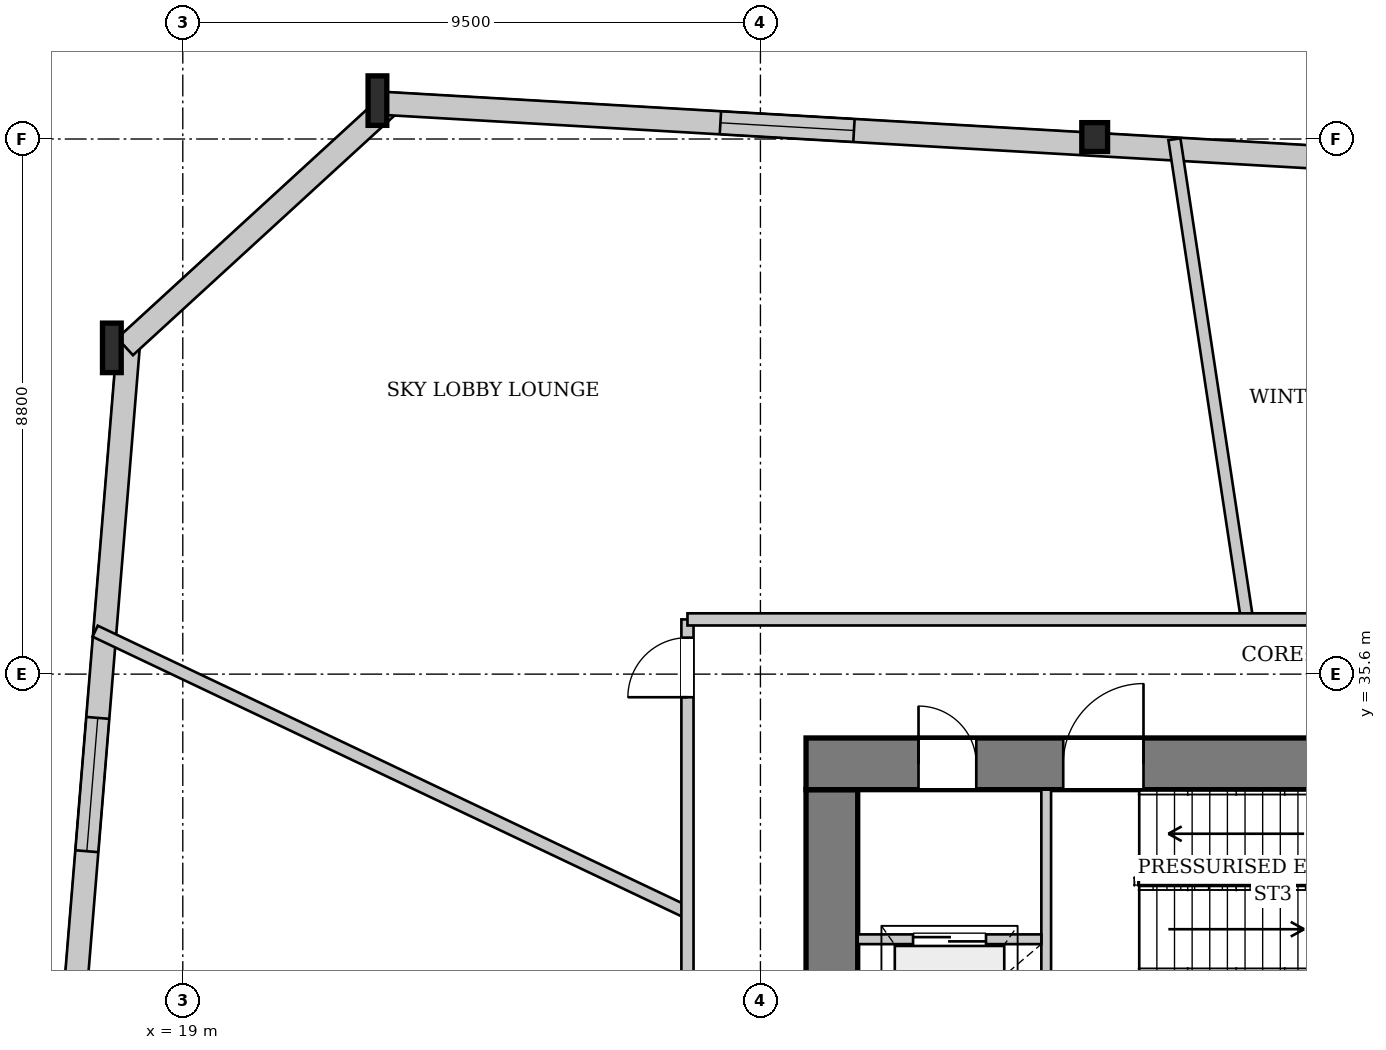
"""IFC4 building model, lengths in metres.
Left out: names, types, materials, properties, quantities, classifications, styles, units other than length and angle.
Written with IfcOpenShell. Run it as: python <this file> out.ifc"""

import sys

from ifc_helpers import new_model, si_unit, direction, frame, frame_2d, origin, origin_2d, place, context, subcontext, project, spatial, rectangle, i_section, extrude, source, transform, mapped, element, fill, save


model = new_model("IFC4")
c1 = context("Model", 3, precision=1e-05, world=origin(), true_north=direction((0.0, 1.0)))
c2 = subcontext(c1, "Body", "Model", "MODEL_VIEW")
j1 = project(units=[si_unit("LENGTHUNIT", "METRE"), si_unit("PLANEANGLEUNIT", "RADIAN")], contexts=[c1])
p1 = place(None, origin())
s1 = spatial("IfcSite", under=j1, at=p1, CompositionType="ELEMENT")
p2 = place(p1, origin())
s2 = spatial("IfcBuilding", under=s1, at=p2, CompositionType="ELEMENT")
p3 = place(p2, frame((0.0, 0.0, 75.9)))
s3 = spatial("IfcBuildingStorey", under=s2, at=p3, CompositionType="ELEMENT", Elevation=75.9)
m1 = source(origin(), c2, "Body", "SweptSolid", [
    extrude(i_section(OverallWidth=0.424, OverallDepth=0.474, WebThickness=0.043, FlangeThickness=0.068, at=origin_2d()), origin(), (0.0, 0.0, 1.0), 3.848),
])
p4 = place(p3, frame((34.143, 44.494, 0.0), z_axis=(-0.075687253982, -0.0318482829, 0.996622860696), x_axis=(0.387849749228, -0.921722611214, 0.0)))
e1 = element("IfcColumn", 1, at=p4, inside=s3, PredefinedType="COLUMN", context=c2, shape_type="MappedRepresentation", body=[
    mapped(m1, transform((0.0, 0.0, 0.0), x_axis=(1.0, 0.0, 0.0), y_axis=(0.0, 1.0, 0.0), z_axis=(0.0, 0.0, 1.0), scale=1.0)),
])
m2 = source(origin(), c2, "Body", "SweptSolid", [
    extrude(i_section(OverallWidth=0.308, OverallDepth=0.814, WebThickness=0.021, FlangeThickness=0.04, at=origin_2d()), origin(), (0.0, 0.0, 1.0), 3.856),
])
p5 = place(p3, frame((22.343, 45.175, 0.0), z_axis=(-0.073565449241, -0.074198542608, 0.994526370165), x_axis=(0.710129855377, -0.704070726918, 0.0)))
e2 = element("IfcColumn", 2, at=p5, inside=s3, PredefinedType="COLUMN", context=c2, shape_type="MappedRepresentation", body=[
    mapped(m2, transform((0.0, 0.0, 0.0), x_axis=(1.0, 0.0, 0.0), y_axis=(0.0, 1.0, 0.0), z_axis=(0.0, 0.0, 1.0), scale=1.0)),
])
m3 = source(origin(), c2, "Body", "SweptSolid", [
    extrude(i_section(OverallWidth=0.308, OverallDepth=0.814, WebThickness=0.021, FlangeThickness=0.04, at=origin_2d()), origin(), (0.0, 0.0, 1.0), 3.853),
])
p6 = place(p3, frame((17.924, 41.125, 0.0), z_axis=(-0.046893400017, -0.082697144624, 0.995470839003), x_axis=(0.869879191834, -0.493264829086, 0.0)))
e3 = element("IfcColumn", 3, at=p6, inside=s3, PredefinedType="COLUMN", context=c2, shape_type="MappedRepresentation", body=[
    mapped(m3, transform((0.0, 0.0, 0.0), x_axis=(1.0, 0.0, 0.0), y_axis=(0.0, 1.0, 0.0), z_axis=(0.0, 0.0, 1.0), scale=1.0)),
])
p7 = place(p3, frame((16.608, 22.78, 0.0), z_axis=(0.0, 0.0, 1.0), x_axis=(0.081813862086, 0.996647626782, 0.0)))
e4 = element("IfcWall", 4, at=p7, inside=s3, PredefinedType="SOLIDWALL", context=c2, shape_type="SweptSolid", body=[
    extrude(rectangle(XDim=18.391, YDim=0.38, at=frame_2d((9.196, 0.0))), origin(), (0.0, 0.0, 1.0), 2.872),
])
p8 = place(p7, frame((4.049, 0.0, 0.502)))
e5 = element("IfcOpeningElement", 5, at=p8, cuts=e4, PredefinedType="OPENING", context=c2, shape_type="SweptSolid", body=[
    extrude(rectangle(XDim=2.2, YDim=2.25, at=frame_2d((1.1, 1.125))), frame((0.0, 0.2, 0.0), z_axis=(0.0, -1.0, 0.0), x_axis=(1.0, 0.0, 0.0)), (0.0, 0.0, 1.0), 0.4),
])
p9 = place(p7, frame((9.941, 0.0, 0.502)))
e6 = element("IfcOpeningElement", 6, at=p9, cuts=e4, PredefinedType="OPENING", context=c2, shape_type="SweptSolid", body=[
    extrude(rectangle(XDim=2.2, YDim=2.25, at=frame_2d((1.1, 1.125))), frame((0.0, 0.2, 0.0), z_axis=(0.0, -1.0, 0.0), x_axis=(1.0, 0.0, 0.0)), (0.0, 0.0, 1.0), 0.4),
])
p10 = place(p3, frame((18.052, 40.985, 0.0), z_axis=(0.0, 0.0, 1.0), x_axis=(0.73726571063, 0.675602895146, 0.0)))
e7 = element("IfcWall", 7, at=p10, inside=s3, PredefinedType="SOLIDWALL", context=c2, shape_type="SweptSolid", body=[
    extrude(rectangle(XDim=5.994, YDim=0.38, at=frame_2d((2.997, 0.0))), origin(), (0.0, 0.0, 1.0), 2.872),
])
p11 = place(p3, frame((22.332, 44.985, 0.0), z_axis=(0.0, 0.0, 1.0), x_axis=(0.998339907415, -0.057597128944, 0.0)))
e8 = element("IfcWall", 8, at=p11, inside=s3, PredefinedType="SOLIDWALL", context=c2, shape_type="SweptSolid", body=[
    extrude(rectangle(XDim=23.64, YDim=0.38, at=frame_2d((11.82, 0.0))), origin(), (0.0, 0.0, 1.0), 2.872),
])
p12 = place(p11, frame((5.519, 0.0, 0.502)))
e9 = element("IfcOpeningElement", 9, at=p12, cuts=e8, PredefinedType="OPENING", context=c2, shape_type="SweptSolid", body=[
    extrude(rectangle(XDim=2.2, YDim=2.25, at=frame_2d((1.1, 1.125))), frame((0.0, 0.2, 0.0), z_axis=(0.0, -1.0, 0.0), x_axis=(1.0, 0.0, 0.0)), (0.0, 0.0, 1.0), 0.4),
])
p13 = place(p11, frame((15.92, 0.0, 0.502)))
e10 = element("IfcOpeningElement", 10, at=p13, cuts=e8, PredefinedType="OPENING", context=c2, shape_type="SweptSolid", body=[
    extrude(rectangle(XDim=2.2, YDim=2.25, at=frame_2d((1.1, 1.125))), frame((0.0, 0.2, 0.0), z_axis=(0.0, -1.0, 0.0), x_axis=(1.0, 0.0, 0.0)), (0.0, 0.0, 1.0), 0.4),
])
p14 = place(p3, frame((29.675, 19.5, 0.0), z_axis=(0.0, 0.0, 1.0), x_axis=(0.0, 1.0, 0.0)))
e11 = element("IfcWall", 11, at=p14, inside=s3, PredefinedType="SHEAR", context=c2, shape_type="SweptSolid", body=[
    extrude(rectangle(XDim=14.2, YDim=0.85, at=frame_2d((7.1, 0.0))), origin(), (0.0, 0.0, 1.0), 3.58),
])
p15 = place(p14, frame((7.42, 0.0, 0.0)))
e12 = element("IfcOpeningElement", 12, at=p15, cuts=e11, PredefinedType="OPENING", context=c2, shape_type="SweptSolid", body=[
    extrude(rectangle(XDim=1.6, YDim=2.2, at=frame_2d((0.8, 1.1))), frame((0.0, 0.435, 0.0), z_axis=(0.0, -1.0, 0.0), x_axis=(1.0, 0.0, 0.0)), (0.0, 0.0, 1.0), 0.87),
])
p16 = place(p3, frame((29.25, 34.125, 0.0), z_axis=(0.0, 0.0, 1.0), x_axis=(1.0, 0.0, 0.0)))
e13 = element("IfcWall", 13, at=p16, inside=s3, PredefinedType="SHEAR", context=c2, shape_type="SweptSolid", body=[
    extrude(rectangle(XDim=17.5, YDim=0.85, at=frame_2d((8.75, 0.0))), origin(), (0.0, 0.0, 1.0), 3.58),
])
p17 = place(p16, frame((1.85, 0.0, 0.0)))
e14 = element("IfcOpeningElement", 14, at=p17, cuts=e13, PredefinedType="OPENING", context=c2, shape_type="SweptSolid", body=[
    extrude(rectangle(XDim=0.95, YDim=2.1, at=frame_2d((0.475, 1.05))), frame((0.0, 0.435, 0.0), z_axis=(0.0, -1.0, 0.0), x_axis=(1.0, 0.0, 0.0)), (0.0, 0.0, 1.0), 0.87),
])
p18 = place(p16, frame((4.23, 0.0, 0.0)))
e15 = element("IfcOpeningElement", 15, at=p18, cuts=e13, PredefinedType="OPENING", context=c2, shape_type="SweptSolid", body=[
    extrude(rectangle(XDim=1.32, YDim=2.2, at=frame_2d((0.66, 1.1))), frame((0.0, 0.435, 0.0), z_axis=(0.0, -1.0, 0.0), x_axis=(1.0, 0.0, 0.0)), (0.0, 0.0, 1.0), 0.87),
])
p19 = place(p16, frame((15.3, 0.0, 0.0)))
e16 = element("IfcOpeningElement", 16, at=p19, cuts=e13, PredefinedType="OPENING", context=c2, shape_type="SweptSolid", body=[
    extrude(rectangle(XDim=0.95, YDim=2.1, at=frame_2d((0.475, 1.05))), frame((0.0, 0.435, 0.0), z_axis=(0.0, -1.0, 0.0), x_axis=(1.0, 0.0, 0.0)), (0.0, 0.0, 1.0), 0.87),
])
p20 = place(p3, frame((33.2, 28.44, 0.0), z_axis=(0.0, 0.0, 1.0), x_axis=(0.0, 1.0, 0.0)))
e17 = element("IfcWall", 17, at=p20, inside=s3, PredefinedType="PARTITIONING", context=c2, shape_type="SweptSolid", body=[
    extrude(rectangle(XDim=5.26, YDim=0.16, at=frame_2d((2.63, 0.0))), origin(), (0.0, 0.0, 1.0), 3.58),
])
p21 = place(p3, frame((30.1, 31.24, 0.0), z_axis=(0.0, 0.0, 1.0), x_axis=(1.0, 0.0, 0.0)))
e18 = element("IfcWall", 18, at=p21, inside=s3, PredefinedType="PARTITIONING", context=c2, shape_type="SweptSolid", body=[
    extrude(rectangle(XDim=3.02, YDim=0.16, at=frame_2d((1.51, 0.0))), origin(), (0.0, 0.0, 1.0), 3.58),
])
p22 = place(p21, frame((0.91, 0.0, 0.0)))
e19 = element("IfcOpeningElement", 19, at=p22, cuts=e18, PredefinedType="OPENING", context=c2, shape_type="SweptSolid", body=[
    extrude(rectangle(XDim=1.2, YDim=2.2, at=frame_2d((0.6, 1.1))), frame((0.0, 0.09, 0.0), z_axis=(0.0, -1.0, 0.0), x_axis=(1.0, 0.0, 0.0)), (0.0, 0.0, 1.0), 0.18),
])
p23 = place(p3, frame((36.503, 36.5, 0.0), z_axis=(0.0, 0.0, 1.0), x_axis=(-0.14951830516, 0.988758957695, 0.0)))
e20 = element("IfcWall", 20, at=p23, inside=s3, PredefinedType="PARTITIONING", context=c2, shape_type="SweptSolid", body=[
    extrude(rectangle(XDim=7.986, YDim=0.2, at=frame_2d((3.993, 0.0))), origin(), (0.0, 0.0, 1.0), 3.58),
])
p24 = place(p3, frame((27.3, 31.681, 0.0), z_axis=(0.0, 0.0, 1.0), x_axis=(-0.903334087768, 0.428937671318, 0.0)))
e21 = element("IfcWall", 21, at=p24, inside=s3, PredefinedType="PARTITIONING", context=c2, shape_type="SweptSolid", body=[
    extrude(rectangle(XDim=10.784, YDim=0.2, at=frame_2d((5.392, 0.0))), origin(), (0.0, 0.0, 1.0), 3.58),
])
p25 = place(p3, frame((27.3, 16.7, 0.0), z_axis=(0.0, 0.0, 1.0), x_axis=(0.0, 1.0, 0.0)))
e22 = element("IfcWall", 22, at=p25, inside=s3, PredefinedType="PARTITIONING", context=c2, shape_type="SweptSolid", body=[
    extrude(rectangle(XDim=19.8, YDim=0.2, at=frame_2d((9.9, 0.0))), origin(), (0.0, 0.0, 1.0), 3.58),
])
p26 = place(p25, frame((18.52, 0.0, 0.0)))
e23 = element("IfcOpeningElement", 23, at=p26, cuts=e22, PredefinedType="OPENING", context=c2, shape_type="SweptSolid", body=[
    extrude(rectangle(XDim=0.98, YDim=2.15, at=frame_2d((0.49, 1.075))), frame((0.0, 0.11, 0.0), z_axis=(0.0, -1.0, 0.0), x_axis=(1.0, 0.0, 0.0)), (0.0, 0.0, 1.0), 0.22),
])
p27 = place(p25, frame((10.098, 0.0, 0.0)))
e24 = element("IfcOpeningElement", 24, at=p27, cuts=e22, PredefinedType="OPENING", context=c2, shape_type="SweptSolid", body=[
    extrude(rectangle(XDim=0.98, YDim=2.15, at=frame_2d((0.49, 1.075))), frame((0.0, 0.11, 0.0), z_axis=(0.0, -1.0, 0.0), x_axis=(1.0, 0.0, 0.0)), (0.0, 0.0, 1.0), 0.22),
])
p28 = place(p3, frame((27.3, 36.5, 0.0), z_axis=(0.0, 0.0, 1.0), x_axis=(1.0, 0.0, 0.0)))
e25 = element("IfcWall", 25, at=p28, inside=s3, PredefinedType="PARTITIONING", context=c2, shape_type="SweptSolid", body=[
    extrude(rectangle(XDim=21.4, YDim=0.2, at=frame_2d((10.7, 0.0))), origin(), (0.0, 0.0, 1.0), 3.58),
])
p29 = place(p28, frame((15.035, 0.0, 0.0)))
e26 = element("IfcOpeningElement", 26, at=p29, cuts=e25, PredefinedType="OPENING", context=c2, shape_type="SweptSolid", body=[
    extrude(rectangle(XDim=1.6, YDim=2.2, at=frame_2d((0.8, 1.1))), frame((0.0, 0.11, 0.0), z_axis=(0.0, -1.0, 0.0), x_axis=(1.0, 0.0, 0.0)), (0.0, 0.0, 1.0), 0.22),
])
m4 = source(origin(), c2, "Body", "SweptSolid", [
    extrude(rectangle(XDim=2.2, YDim=2.25, at=frame_2d((1.1, 1.125))), frame((0.0, 0.03, 0.0), z_axis=(0.0, -1.0, 0.0), x_axis=(1.0, 0.0, 0.0)), (0.0, 0.0, 1.0), 0.06),
])
p30 = place(p9, origin())
e27 = element("IfcWindow", 27, at=p30, inside=s3, PartitioningType="SINGLE_PANEL", PredefinedType="WINDOW", context=c2, shape_type="MappedRepresentation", body=[
    mapped(m4, transform((0.0, 0.0, 0.0), x_axis=(1.0, 0.0, 0.0), y_axis=(0.0, 1.0, 0.0), z_axis=(0.0, 0.0, 1.0), scale=1.0)),
])
fill(e6, e27)
p31 = place(p12, origin())
e28 = element("IfcWindow", 28, at=p31, inside=s3, PartitioningType="SINGLE_PANEL", PredefinedType="WINDOW", context=c2, shape_type="MappedRepresentation", body=[
    mapped(m4, transform((0.0, 0.0, 0.0), x_axis=(1.0, 0.0, 0.0), y_axis=(0.0, 1.0, 0.0), z_axis=(0.0, 0.0, 1.0), scale=1.0)),
])
fill(e9, e28)
m5 = source(origin(), c2, "Body", "SweptSolid", [
    extrude(rectangle(XDim=0.95, YDim=2.1, at=frame_2d((0.475, 1.05))), frame((0.0, 0.025, 0.0), z_axis=(0.0, -1.0, 0.0), x_axis=(1.0, 0.0, 0.0)), (0.0, 0.0, 1.0), 0.05),
])
p32 = place(p17, origin())
e29 = element("IfcDoor", 29, at=p32, inside=s3, OperationType="SINGLE_SWING_LEFT", PredefinedType="DOOR", context=c2, shape_type="MappedRepresentation", body=[
    mapped(m5, transform((0.0, 0.0, 0.0), x_axis=(1.0, 0.0, 0.0), y_axis=(0.0, 1.0, 0.0), z_axis=(0.0, 0.0, 1.0), scale=1.0)),
])
fill(e14, e29)
m6 = source(origin(), c2, "Body", "SweptSolid", [
    extrude(rectangle(XDim=1.32, YDim=2.2, at=frame_2d((0.66, 1.1))), frame((0.0, 0.025, 0.0), z_axis=(0.0, -1.0, 0.0), x_axis=(1.0, 0.0, 0.0)), (0.0, 0.0, 1.0), 0.05),
])
p33 = place(p18, origin())
e30 = element("IfcDoor", 30, at=p33, inside=s3, OperationType="SINGLE_SWING_RIGHT", PredefinedType="DOOR", context=c2, shape_type="MappedRepresentation", body=[
    mapped(m6, transform((0.0, 0.0, 0.0), x_axis=(1.0, 0.0, 0.0), y_axis=(0.0, 1.0, 0.0), z_axis=(0.0, 0.0, 1.0), scale=1.0)),
])
fill(e15, e30)
m7 = source(origin(), c2, "Body", "SweptSolid", [
    extrude(rectangle(XDim=1.2, YDim=2.2, at=frame_2d((0.6, 1.1))), frame((0.0, 0.025, 0.0), z_axis=(0.0, -1.0, 0.0), x_axis=(1.0, 0.0, 0.0)), (0.0, 0.0, 1.0), 0.05),
])
p34 = place(p22, origin())
e31 = element("IfcDoor", 31, at=p34, inside=s3, OperationType="DOUBLE_DOOR_SLIDING", PredefinedType="DOOR", context=c2, shape_type="MappedRepresentation", body=[
    mapped(m7, transform((0.0, 0.0, 0.0), x_axis=(1.0, 0.0, 0.0), y_axis=(0.0, 1.0, 0.0), z_axis=(0.0, 0.0, 1.0), scale=1.0)),
])
fill(e19, e31)
m8 = source(origin(), c2, "Body", "SweptSolid", [
    extrude(rectangle(XDim=0.98, YDim=2.15, at=frame_2d((0.49, 1.075))), frame((0.0, 0.025, 0.0), z_axis=(0.0, -1.0, 0.0), x_axis=(1.0, 0.0, 0.0)), (0.0, 0.0, 1.0), 0.05),
])
p35 = place(p26, origin())
e32 = element("IfcDoor", 32, at=p35, inside=s3, OperationType="SINGLE_SWING_LEFT", PredefinedType="DOOR", context=c2, shape_type="MappedRepresentation", body=[
    mapped(m8, transform((0.0, 0.0, 0.0), x_axis=(1.0, 0.0, 0.0), y_axis=(0.0, 1.0, 0.0), z_axis=(0.0, 0.0, 1.0), scale=1.0)),
])
fill(e23, e32)
save(model, sys.argv[1])
